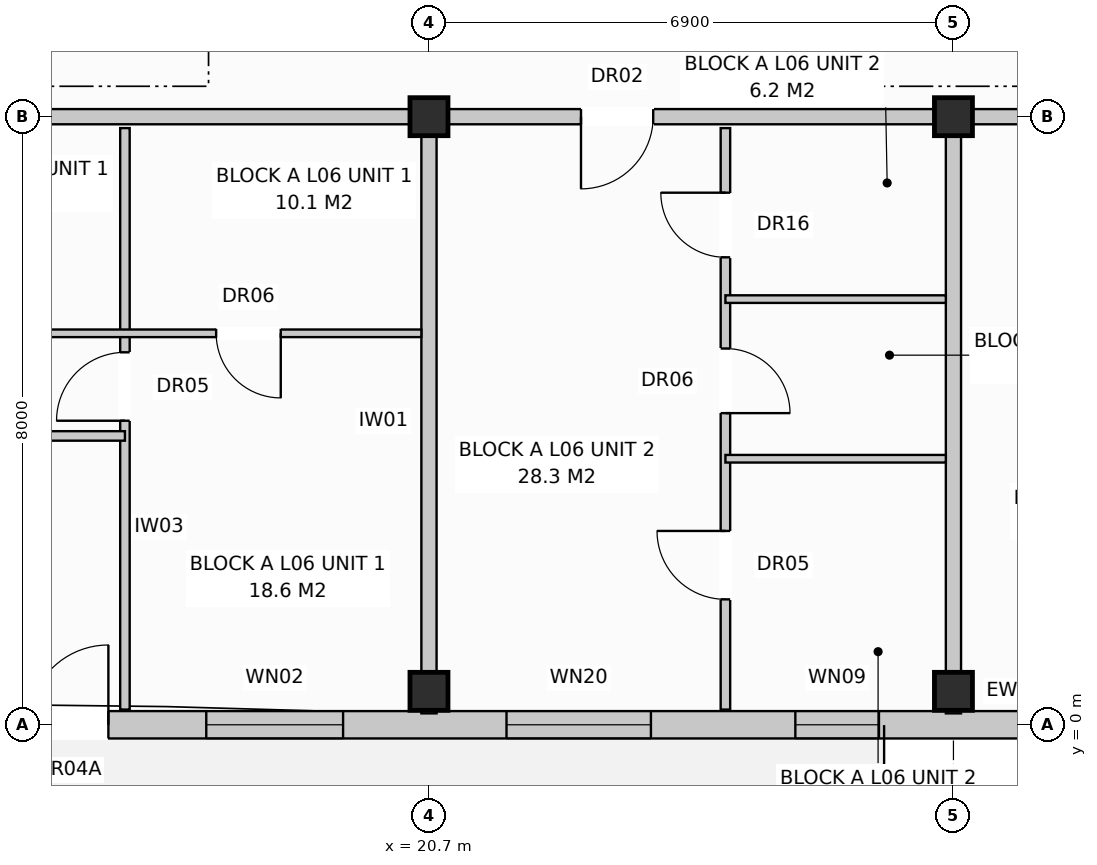
"""IFC4 building model, lengths in metres.
Left out: names, types, materials, properties, quantities, classifications, styles, units other than length and angle.
Written with IfcOpenShell. Run it as: python <this file> out.ifc"""

import sys

from ifc_helpers import new_model, si_unit, direction, frame, frame_2d, origin, origin_with_axes, origin_2d, place, context, subcontext, project, spatial, rectangle, extrude, element, fill, save


model = new_model("IFC4")
c1 = context("Model", 3, precision=1e-05, world=origin(), true_north=direction((0.0, 1.0)))
c2 = subcontext(c1, "Body", "Model", "MODEL_VIEW")
j1 = project(units=[si_unit("LENGTHUNIT", "METRE"), si_unit("PLANEANGLEUNIT", "RADIAN")], contexts=[c1])
p1 = place(None, origin())
s1 = spatial("IfcSite", under=j1, at=p1, CompositionType="ELEMENT")
p2 = place(p1, origin())
s2 = spatial("IfcBuilding", under=s1, at=p2, CompositionType="ELEMENT")
p3 = place(p2, frame((0.0, 0.0, 20.8)))
s3 = spatial("IfcBuildingStorey", under=s2, at=p3, CompositionType="ELEMENT", Elevation=20.8)
for number, where, z_axis, x_axis in (
    (1, (20.7, 0.44, 0.0), (0.0, 0.0, 1.0), (1.0, 0.0, 0.0)),
    (2, (20.7, 8.0, 0.0), (0.0, 0.0, 1.0), (1.0, 0.0, 0.0)),
    (3, (27.6, 0.44, 0.0), (0.0, 0.0, 1.0), (1.0, 0.0, 0.0)),
    (4, (27.6, 8.0, 0.0), (0.0, 0.0, 1.0), (1.0, 0.0, 0.0)),
):
    element("IfcColumn", number, at=place(p3, frame(where, z_axis=z_axis, x_axis=x_axis)), inside=s3, PredefinedType="COLUMN", context=c2, shape_type="SweptSolid", body=[
        extrude(rectangle(XDim=0.5, YDim=0.5, at=origin_2d()), origin(), (0.0, 0.0, 1.0), 3.2),
    ])
p4 = place(p3, frame((0.17, 0.0, 0.0), z_axis=(0.0, 0.0, 1.0), x_axis=(1.0, 0.0, 0.0)))
e5 = element("IfcWall", 5, at=p4, inside=s3, PredefinedType="STANDARD", context=c2, shape_type="SweptSolid", body=[
    extrude(rectangle(XDim=54.86, YDim=0.36, at=frame_2d((27.43, 0.0))), origin(), (0.0, 0.0, 1.0), 2.95),
])
p5 = place(p4, frame((4.862, 0.0, 0.0)))
e6 = element("IfcOpeningElement", 6, at=p5, cuts=e5, PredefinedType="OPENING", context=c2, shape_type="SweptSolid", body=[
    extrude(rectangle(XDim=1.05, YDim=2.12, at=frame_2d((0.525, 1.06))), frame((0.0, 0.192, 0.0), z_axis=(0.0, -1.0, 0.0), x_axis=(1.0, 0.0, 0.0)), (0.0, 0.0, 1.0), 0.384),
])
p6 = place(p4, frame((15.262, 0.0, 0.0)))
e7 = element("IfcOpeningElement", 7, at=p6, cuts=e5, PredefinedType="OPENING", context=c2, shape_type="SweptSolid", body=[
    extrude(rectangle(XDim=1.05, YDim=2.12, at=frame_2d((0.525, 1.06))), frame((0.0, 0.192, 0.0), z_axis=(0.0, -1.0, 0.0), x_axis=(1.0, 0.0, 0.0)), (0.0, 0.0, 1.0), 0.384),
])
p7 = place(p4, frame((31.362, 0.0, 0.0)))
e8 = element("IfcOpeningElement", 8, at=p7, cuts=e5, PredefinedType="OPENING", context=c2, shape_type="SweptSolid", body=[
    extrude(rectangle(XDim=1.05, YDim=2.12, at=frame_2d((0.525, 1.06))), frame((0.0, 0.192, 0.0), z_axis=(0.0, -1.0, 0.0), x_axis=(1.0, 0.0, 0.0)), (0.0, 0.0, 1.0), 0.384),
])
p8 = place(p4, frame((44.235, 0.0, 0.0)))
e9 = element("IfcOpeningElement", 9, at=p8, cuts=e5, PredefinedType="OPENING", context=c2, shape_type="SweptSolid", body=[
    extrude(rectangle(XDim=1.05, YDim=2.12, at=frame_2d((0.525, 1.06))), frame((0.0, 0.192, 0.0), z_axis=(0.0, -1.0, 0.0), x_axis=(1.0, 0.0, 0.0)), (0.0, 0.0, 1.0), 0.384),
])
p9 = place(p4, frame((2.1, 0.0, 0.8)))
e10 = element("IfcOpeningElement", 10, at=p9, cuts=e5, PredefinedType="OPENING", context=c2, shape_type="SweptSolid", body=[
    extrude(rectangle(XDim=1.8, YDim=1.7, at=frame_2d((0.9, 0.85))), frame((0.0, 0.192, 0.0), z_axis=(0.0, -1.0, 0.0), x_axis=(1.0, 0.0, 0.0)), (0.0, 0.0, 1.0), 0.384),
])
p10 = place(p4, frame((7.75, 0.0, 0.72)))
e11 = element("IfcOpeningElement", 11, at=p10, cuts=e5, PredefinedType="OPENING", context=c2, shape_type="SweptSolid", body=[
    extrude(rectangle(XDim=1.9, YDim=1.85, at=frame_2d((0.95, 0.925))), frame((0.0, 0.192, 0.0), z_axis=(0.0, -1.0, 0.0), x_axis=(1.0, 0.0, 0.0)), (0.0, 0.0, 1.0), 0.384),
])
p11 = place(p4, frame((11.8, 0.0, 0.72)))
e12 = element("IfcOpeningElement", 12, at=p11, cuts=e5, PredefinedType="OPENING", context=c2, shape_type="SweptSolid", body=[
    extrude(rectangle(XDim=1.1, YDim=1.5, at=frame_2d((0.55, 0.75))), frame((0.0, 0.192, 0.0), z_axis=(0.0, -1.0, 0.0), x_axis=(1.0, 0.0, 0.0)), (0.0, 0.0, 1.0), 0.384),
])
p12 = place(p4, frame((17.6, 0.0, 0.8)))
e13 = element("IfcOpeningElement", 13, at=p12, cuts=e5, PredefinedType="OPENING", context=c2, shape_type="SweptSolid", body=[
    extrude(rectangle(XDim=1.8, YDim=1.7, at=frame_2d((0.9, 0.85))), frame((0.0, 0.192, 0.0), z_axis=(0.0, -1.0, 0.0), x_axis=(1.0, 0.0, 0.0)), (0.0, 0.0, 1.0), 0.384),
])
p13 = place(p4, frame((21.55, 0.0, 0.72)))
e14 = element("IfcOpeningElement", 14, at=p13, cuts=e5, PredefinedType="OPENING", context=c2, shape_type="SweptSolid", body=[
    extrude(rectangle(XDim=1.9, YDim=1.85, at=frame_2d((0.95, 0.925))), frame((0.0, 0.192, 0.0), z_axis=(0.0, -1.0, 0.0), x_axis=(1.0, 0.0, 0.0)), (0.0, 0.0, 1.0), 0.384),
])
p14 = place(p4, frame((25.35, 0.0, 0.72)))
e15 = element("IfcOpeningElement", 15, at=p14, cuts=e5, PredefinedType="OPENING", context=c2, shape_type="SweptSolid", body=[
    extrude(rectangle(XDim=1.1, YDim=1.5, at=frame_2d((0.55, 0.75))), frame((0.0, 0.192, 0.0), z_axis=(0.0, -1.0, 0.0), x_axis=(1.0, 0.0, 0.0)), (0.0, 0.0, 1.0), 0.384),
])
p15 = place(p4, frame((29.2, 0.0, 0.8)))
e16 = element("IfcOpeningElement", 16, at=p15, cuts=e5, PredefinedType="OPENING", context=c2, shape_type="SweptSolid", body=[
    extrude(rectangle(XDim=1.8, YDim=1.7, at=frame_2d((0.9, 0.85))), frame((0.0, 0.192, 0.0), z_axis=(0.0, -1.0, 0.0), x_axis=(1.0, 0.0, 0.0)), (0.0, 0.0, 1.0), 0.384),
])
p16 = place(p4, frame((34.833, 0.0, 0.72)))
e17 = element("IfcOpeningElement", 17, at=p16, cuts=e5, PredefinedType="OPENING", context=c2, shape_type="SweptSolid", body=[
    extrude(rectangle(XDim=1.9, YDim=1.85, at=frame_2d((0.95, 0.925))), frame((0.0, 0.192, 0.0), z_axis=(0.0, -1.0, 0.0), x_axis=(1.0, 0.0, 0.0)), (0.0, 0.0, 1.0), 0.384),
])
p17 = place(p4, frame((38.025, 0.0, 0.8)))
e18 = element("IfcOpeningElement", 18, at=p17, cuts=e5, PredefinedType="OPENING", context=c2, shape_type="SweptSolid", body=[
    extrude(rectangle(XDim=1.95, YDim=1.65, at=frame_2d((0.975, 0.825))), frame((0.0, 0.192, 0.0), z_axis=(0.0, -1.0, 0.0), x_axis=(1.0, 0.0, 0.0)), (0.0, 0.0, 1.0), 0.384),
])
p18 = place(p4, frame((42.1, 0.0, 0.8)))
e19 = element("IfcOpeningElement", 19, at=p18, cuts=e5, PredefinedType="OPENING", context=c2, shape_type="SweptSolid", body=[
    extrude(rectangle(XDim=1.8, YDim=1.7, at=frame_2d((0.9, 0.85))), frame((0.0, 0.192, 0.0), z_axis=(0.0, -1.0, 0.0), x_axis=(1.0, 0.0, 0.0)), (0.0, 0.0, 1.0), 0.384),
])
p19 = place(p4, frame((45.75, 0.0, 0.72)))
e20 = element("IfcOpeningElement", 20, at=p19, cuts=e5, PredefinedType="OPENING", context=c2, shape_type="SweptSolid", body=[
    extrude(rectangle(XDim=1.9, YDim=1.85, at=frame_2d((0.95, 0.925))), frame((0.0, 0.192, 0.0), z_axis=(0.0, -1.0, 0.0), x_axis=(1.0, 0.0, 0.0)), (0.0, 0.0, 1.0), 0.384),
])
p20 = place(p4, frame((49.125, 0.0, 0.8)))
e21 = element("IfcOpeningElement", 21, at=p20, cuts=e5, PredefinedType="OPENING", context=c2, shape_type="SweptSolid", body=[
    extrude(rectangle(XDim=1.95, YDim=1.65, at=frame_2d((0.975, 0.825))), frame((0.0, 0.192, 0.0), z_axis=(0.0, -1.0, 0.0), x_axis=(1.0, 0.0, 0.0)), (0.0, 0.0, 1.0), 0.384),
])
p21 = place(p4, frame((52.415, 0.0, 0.8)))
e22 = element("IfcOpeningElement", 22, at=p21, cuts=e5, PredefinedType="OPENING", context=c2, shape_type="SweptSolid", body=[
    extrude(rectangle(XDim=1.8, YDim=1.7, at=frame_2d((0.9, 0.85))), frame((0.0, 0.192, 0.0), z_axis=(0.0, -1.0, 0.0), x_axis=(1.0, 0.0, 0.0)), (0.0, 0.0, 1.0), 0.384),
])
p22 = place(p3, frame((20.7, 7.85, 0.0), z_axis=(0.0, 0.0, 1.0), x_axis=(0.0, -1.0, 0.0)))
e23 = element("IfcWall", 23, at=p22, inside=s3, PredefinedType="PARTITIONING", context=c2, shape_type="SweptSolid", body=[
    extrude(rectangle(XDim=7.7, YDim=0.2, at=frame_2d((3.85, 0.0))), origin(), (0.0, 0.0, 1.0), 2.95),
])
p23 = place(p3, frame((0.0, 8.0, 0.0), z_axis=(0.0, 0.0, 1.0), x_axis=(1.0, 0.0, 0.0)))
e24 = element("IfcWall", 24, at=p23, inside=s3, PredefinedType="PARTITIONING", context=c2, shape_type="SweptSolid", body=[
    extrude(rectangle(XDim=20.7, YDim=0.2, at=frame_2d((10.35, 0.0))), origin(), (0.0, 0.0, 1.0), 2.39),
])
p24 = place(p23, frame((2.4, 0.0, 0.0)))
e25 = element("IfcOpeningElement", 25, at=p24, cuts=e24, PredefinedType="OPENING", context=c2, shape_type="SweptSolid", body=[
    extrude(rectangle(XDim=0.95, YDim=2.15, at=frame_2d((0.475, 1.075))), frame((0.0, 0.112, 0.0), z_axis=(0.0, -1.0, 0.0), x_axis=(1.0, 0.0, 0.0)), (0.0, 0.0, 1.0), 0.224),
])
p25 = place(p3, frame((16.7, 7.85, 0.0), z_axis=(0.0, 0.0, 1.0), x_axis=(0.0, -1.0, 0.0)))
e26 = element("IfcWall", 26, at=p25, inside=s3, PredefinedType="PARTITIONING", context=c2, shape_type="SweptSolid", body=[
    extrude(rectangle(XDim=7.65, YDim=0.125, at=frame_2d((3.825, 0.0))), origin(), (0.0, 0.0, 1.0), 2.95),
])
p26 = place(p25, frame((2.95, 0.0, 0.0)))
e27 = element("IfcOpeningElement", 27, at=p26, cuts=e26, PredefinedType="OPENING", context=c2, shape_type="SweptSolid", body=[
    extrude(rectangle(XDim=0.9, YDim=2.1, at=frame_2d((0.45, 1.05))), frame((0.0, 0.074, 0.0), z_axis=(0.0, -1.0, 0.0), x_axis=(1.0, 0.0, 0.0)), (0.0, 0.0, 1.0), 0.149),
])
p27 = place(p3, frame((6.3, 5.15, 0.0), z_axis=(0.0, 0.0, 1.0), x_axis=(1.0, 0.0, 0.0)))
e28 = element("IfcWall", 28, at=p27, inside=s3, PredefinedType="PARTITIONING", context=c2, shape_type="SweptSolid", body=[
    extrude(rectangle(XDim=14.3, YDim=0.1, at=frame_2d((7.15, 0.0))), origin(), (0.0, 0.0, 1.0), 2.95),
])
p28 = place(p27, frame((1.6, 0.0, 0.0)))
e29 = element("IfcOpeningElement", 29, at=p28, cuts=e28, PredefinedType="OPENING", context=c2, shape_type="SweptSolid", body=[
    extrude(rectangle(XDim=0.9, YDim=2.1, at=frame_2d((0.45, 1.05))), frame((0.0, 0.062, 0.0), z_axis=(0.0, -1.0, 0.0), x_axis=(1.0, 0.0, 0.0)), (0.0, 0.0, 1.0), 0.124),
])
p29 = place(p27, frame((5.1, 0.0, 0.0)))
e30 = element("IfcOpeningElement", 30, at=p29, cuts=e28, PredefinedType="OPENING", context=c2, shape_type="SweptSolid", body=[
    extrude(rectangle(XDim=0.85, YDim=2.05, at=frame_2d((0.425, 1.025))), frame((0.0, 0.062, 0.0), z_axis=(0.0, -1.0, 0.0), x_axis=(1.0, 0.0, 0.0)), (0.0, 0.0, 1.0), 0.124),
])
p30 = place(p27, frame((8.2, 0.0, 0.0)))
e31 = element("IfcOpeningElement", 31, at=p30, cuts=e28, PredefinedType="OPENING", context=c2, shape_type="SweptSolid", body=[
    extrude(rectangle(XDim=0.85, YDim=2.05, at=frame_2d((0.425, 1.025))), frame((0.0, 0.062, 0.0), z_axis=(0.0, -1.0, 0.0), x_axis=(1.0, 0.0, 0.0)), (0.0, 0.0, 1.0), 0.124),
])
p31 = place(p27, frame((11.6, 0.0, 0.0)))
e32 = element("IfcOpeningElement", 32, at=p31, cuts=e28, PredefinedType="OPENING", context=c2, shape_type="SweptSolid", body=[
    extrude(rectangle(XDim=0.85, YDim=2.05, at=frame_2d((0.425, 1.025))), frame((0.0, 0.062, 0.0), z_axis=(0.0, -1.0, 0.0), x_axis=(1.0, 0.0, 0.0)), (0.0, 0.0, 1.0), 0.124),
])
p32 = place(p3, frame((6.3, 3.8, 0.0), z_axis=(0.0, 0.0, 1.0), x_axis=(1.0, 0.0, 0.0)))
e33 = element("IfcWall", 33, at=p32, inside=s3, PredefinedType="PARTITIONING", context=c2, shape_type="SweptSolid", body=[
    extrude(rectangle(XDim=10.4, YDim=0.125, at=frame_2d((5.2, 0.0))), origin(), (0.0, 0.0, 1.0), 2.95),
])
p33 = place(p32, frame((2.0, 0.0, 0.0)))
e34 = element("IfcOpeningElement", 34, at=p33, cuts=e33, PredefinedType="OPENING", context=c2, shape_type="SweptSolid", body=[
    extrude(rectangle(XDim=0.9, YDim=2.1, at=frame_2d((0.45, 1.05))), frame((0.0, 0.074, 0.0), z_axis=(0.0, -1.0, 0.0), x_axis=(1.0, 0.0, 0.0)), (0.0, 0.0, 1.0), 0.149),
])
p34 = place(p32, frame((7.2, 0.0, 0.0)))
e35 = element("IfcOpeningElement", 35, at=p34, cuts=e33, PredefinedType="OPENING", context=c2, shape_type="SweptSolid", body=[
    extrude(rectangle(XDim=0.9, YDim=2.1, at=frame_2d((0.45, 1.05))), frame((0.0, 0.074, 0.0), z_axis=(0.0, -1.0, 0.0), x_axis=(1.0, 0.0, 0.0)), (0.0, 0.0, 1.0), 0.149),
])
p35 = place(p3, frame((27.6, 7.85, 0.0), z_axis=(0.0, 0.0, 1.0), x_axis=(0.0, -1.0, 0.0)))
e36 = element("IfcWall", 36, at=p35, inside=s3, PredefinedType="PARTITIONING", context=c2, shape_type="SweptSolid", body=[
    extrude(rectangle(XDim=7.7, YDim=0.2, at=frame_2d((3.85, 0.0))), origin(), (0.0, 0.0, 1.0), 2.95),
])
p36 = place(p3, frame((20.7, 8.0, 0.0), z_axis=(0.0, 0.0, 1.0), x_axis=(1.0, 0.0, 0.0)))
e37 = element("IfcWall", 37, at=p36, inside=s3, PredefinedType="PARTITIONING", context=c2, shape_type="SweptSolid", body=[
    extrude(rectangle(XDim=6.9, YDim=0.2, at=frame_2d((3.45, 0.0))), origin(), (0.0, 0.0, 1.0), 2.39),
])
p37 = place(p36, frame((2.0, 0.0, 0.0)))
e38 = element("IfcOpeningElement", 38, at=p37, cuts=e37, PredefinedType="OPENING", context=c2, shape_type="SweptSolid", body=[
    extrude(rectangle(XDim=0.95, YDim=2.15, at=frame_2d((0.475, 1.075))), frame((0.0, 0.112, 0.0), z_axis=(0.0, -1.0, 0.0), x_axis=(1.0, 0.0, 0.0)), (0.0, 0.0, 1.0), 0.224),
])
p38 = place(p3, frame((24.6, 7.85, 0.0), z_axis=(0.0, 0.0, 1.0), x_axis=(0.0, -1.0, 0.0)))
e39 = element("IfcWall", 39, at=p38, inside=s3, PredefinedType="PARTITIONING", context=c2, shape_type="SweptSolid", body=[
    extrude(rectangle(XDim=7.65, YDim=0.125, at=frame_2d((3.825, 0.0))), origin(), (0.0, 0.0, 1.0), 2.95),
])
p39 = place(p38, frame((0.85, 0.0, 0.0)))
e40 = element("IfcOpeningElement", 40, at=p39, cuts=e39, PredefinedType="OPENING", context=c2, shape_type="SweptSolid", body=[
    extrude(rectangle(XDim=0.85, YDim=2.1, at=frame_2d((0.425, 1.05))), frame((0.0, 0.074, 0.0), z_axis=(0.0, -1.0, 0.0), x_axis=(1.0, 0.0, 0.0)), (0.0, 0.0, 1.0), 0.149),
])
p40 = place(p38, frame((2.9, 0.0, 0.0)))
e41 = element("IfcOpeningElement", 41, at=p40, cuts=e39, PredefinedType="OPENING", context=c2, shape_type="SweptSolid", body=[
    extrude(rectangle(XDim=0.85, YDim=2.05, at=frame_2d((0.425, 1.025))), frame((0.0, 0.074, 0.0), z_axis=(0.0, -1.0, 0.0), x_axis=(1.0, 0.0, 0.0)), (0.0, 0.0, 1.0), 0.149),
])
p41 = place(p38, frame((5.3, 0.0, 0.0)))
e42 = element("IfcOpeningElement", 42, at=p41, cuts=e39, PredefinedType="OPENING", context=c2, shape_type="SweptSolid", body=[
    extrude(rectangle(XDim=0.9, YDim=2.1, at=frame_2d((0.45, 1.05))), frame((0.0, 0.074, 0.0), z_axis=(0.0, -1.0, 0.0), x_axis=(1.0, 0.0, 0.0)), (0.0, 0.0, 1.0), 0.149),
])
for number, where, z_axis, x_axis in (
    (43, (24.6, 5.6, 0.0), (0.0, 0.0, 1.0), (1.0, 0.0, 0.0)),
    (44, (24.6, 3.5, 0.0), (0.0, 0.0, 1.0), (1.0, 0.0, 0.0)),
):
    element("IfcWall", number, at=place(p3, frame(where, z_axis=z_axis, x_axis=x_axis)), inside=s3, PredefinedType="PARTITIONING", context=c2, shape_type="SweptSolid", body=[
        extrude(rectangle(XDim=2.9, YDim=0.1, at=frame_2d((1.45, 0.0))), origin(), (0.0, 0.0, 1.0), 2.95),
    ])
p42 = place(p3, frame((27.6, 8.0, 0.0), z_axis=(0.0, 0.0, 1.0), x_axis=(1.0, 0.0, 0.0)))
e45 = element("IfcWall", 45, at=p42, inside=s3, PredefinedType="PARTITIONING", context=c2, shape_type="SweptSolid", body=[
    extrude(rectangle(XDim=13.8, YDim=0.2, at=frame_2d((6.9, 0.0))), origin(), (0.0, 0.0, 1.0), 2.39),
])
p43 = place(p42, frame((2.4, 0.0, 0.0)))
e46 = element("IfcOpeningElement", 46, at=p43, cuts=e45, PredefinedType="OPENING", context=c2, shape_type="SweptSolid", body=[
    extrude(rectangle(XDim=0.95, YDim=2.15, at=frame_2d((0.475, 1.075))), frame((0.0, 0.112, 0.0), z_axis=(0.0, -1.0, 0.0), x_axis=(1.0, 0.0, 0.0)), (0.0, 0.0, 1.0), 0.224),
])
p44 = place(p6, origin_with_axes())
e47 = element("IfcDoor", 47, at=p44, inside=s3, OperationType="SINGLE_SWING_RIGHT", PredefinedType="DOOR", context=c2, shape_type="SweptSolid", body=[
    extrude(rectangle(XDim=1.05, YDim=2.12, at=frame_2d((0.525, 1.06))), frame((0.0, 0.025, 0.0), z_axis=(0.0, -1.0, 0.0), x_axis=(1.0, 0.0, 0.0)), (0.0, 0.0, 1.0), 0.05),
])
fill(e7, e47)
p45 = place(p12, origin_with_axes())
e48 = element("IfcWindow", 48, at=p45, inside=s3, PartitioningType="SINGLE_PANEL", PredefinedType="WINDOW", context=c2, shape_type="SweptSolid", body=[
    extrude(rectangle(XDim=1.8, YDim=1.7, at=frame_2d((0.9, 0.85))), frame((0.0, 0.03, 0.0), z_axis=(0.0, -1.0, 0.0), x_axis=(1.0, 0.0, 0.0)), (0.0, 0.0, 1.0), 0.06),
])
fill(e13, e48)
p46 = place(p13, origin_with_axes())
e49 = element("IfcWindow", 49, at=p46, inside=s3, PartitioningType="SINGLE_PANEL", PredefinedType="WINDOW", context=c2, shape_type="SweptSolid", body=[
    extrude(rectangle(XDim=1.9, YDim=1.85, at=frame_2d((0.95, 0.925))), frame((0.0, 0.03, 0.0), z_axis=(0.0, -1.0, 0.0), x_axis=(1.0, 0.0, 0.0)), (0.0, 0.0, 1.0), 0.06),
])
fill(e14, e49)
p47 = place(p14, origin_with_axes())
e50 = element("IfcWindow", 50, at=p47, inside=s3, PartitioningType="SINGLE_PANEL", PredefinedType="WINDOW", context=c2, shape_type="SweptSolid", body=[
    extrude(rectangle(XDim=1.1, YDim=1.5, at=frame_2d((0.55, 0.75))), frame((0.0, 0.03, 0.0), z_axis=(0.0, -1.0, 0.0), x_axis=(1.0, 0.0, 0.0)), (0.0, 0.0, 1.0), 0.06),
])
fill(e15, e50)
p48 = place(p26, frame((0.9, 0.0, 0.0), z_axis=(0.0, 0.0, 1.0), x_axis=(-1.0, 0.0, 0.0)))
e51 = element("IfcDoor", 51, at=p48, inside=s3, OperationType="SINGLE_SWING_RIGHT", PredefinedType="DOOR", context=c2, shape_type="SweptSolid", body=[
    extrude(rectangle(XDim=0.9, YDim=2.1, at=frame_2d((0.45, 1.05))), frame((0.0, 0.025, 0.0), z_axis=(0.0, -1.0, 0.0), x_axis=(1.0, 0.0, 0.0)), (0.0, 0.0, 1.0), 0.05),
])
fill(e27, e51)
p49 = place(p31, frame((0.85, 0.0, 0.0), z_axis=(0.0, 0.0, 1.0), x_axis=(-1.0, 0.0, 0.0)))
e52 = element("IfcDoor", 52, at=p49, inside=s3, OperationType="SINGLE_SWING_RIGHT", PredefinedType="DOOR", context=c2, shape_type="SweptSolid", body=[
    extrude(rectangle(XDim=0.85, YDim=2.05, at=frame_2d((0.425, 1.025))), frame((0.0, 0.025, 0.0), z_axis=(0.0, -1.0, 0.0), x_axis=(1.0, 0.0, 0.0)), (0.0, 0.0, 1.0), 0.05),
])
fill(e32, e52)
p50 = place(p37, frame((0.95, 0.0, 0.0), z_axis=(0.0, 0.0, 1.0), x_axis=(-1.0, 0.0, 0.0)))
e53 = element("IfcDoor", 53, at=p50, inside=s3, OperationType="SINGLE_SWING_LEFT", PredefinedType="DOOR", context=c2, shape_type="SweptSolid", body=[
    extrude(rectangle(XDim=0.95, YDim=2.15, at=frame_2d((0.475, 1.075))), frame((0.0, 0.025, 0.0), z_axis=(0.0, -1.0, 0.0), x_axis=(1.0, 0.0, 0.0)), (0.0, 0.0, 1.0), 0.05),
])
fill(e38, e53)
p51 = place(p39, frame((0.85, 0.0, 0.0), z_axis=(0.0, 0.0, 1.0), x_axis=(-1.0, 0.0, 0.0)))
e54 = element("IfcDoor", 54, at=p51, inside=s3, OperationType="SINGLE_SWING_LEFT", PredefinedType="DOOR", context=c2, shape_type="SweptSolid", body=[
    extrude(rectangle(XDim=0.85, YDim=2.1, at=frame_2d((0.425, 1.05))), frame((0.0, 0.025, 0.0), z_axis=(0.0, -1.0, 0.0), x_axis=(1.0, 0.0, 0.0)), (0.0, 0.0, 1.0), 0.05),
])
fill(e40, e54)
p52 = place(p40, origin_with_axes())
e55 = element("IfcDoor", 55, at=p52, inside=s3, OperationType="SINGLE_SWING_RIGHT", PredefinedType="DOOR", context=c2, shape_type="SweptSolid", body=[
    extrude(rectangle(XDim=0.85, YDim=2.05, at=frame_2d((0.425, 1.025))), frame((0.0, 0.025, 0.0), z_axis=(0.0, -1.0, 0.0), x_axis=(1.0, 0.0, 0.0)), (0.0, 0.0, 1.0), 0.05),
])
fill(e41, e55)
p53 = place(p41, frame((0.9, 0.0, 0.0), z_axis=(0.0, 0.0, 1.0), x_axis=(-1.0, 0.0, 0.0)))
e56 = element("IfcDoor", 56, at=p53, inside=s3, OperationType="SINGLE_SWING_LEFT", PredefinedType="DOOR", context=c2, shape_type="SweptSolid", body=[
    extrude(rectangle(XDim=0.9, YDim=2.1, at=frame_2d((0.45, 1.05))), frame((0.0, 0.025, 0.0), z_axis=(0.0, -1.0, 0.0), x_axis=(1.0, 0.0, 0.0)), (0.0, 0.0, 1.0), 0.05),
])
fill(e42, e56)
save(model, sys.argv[1])
